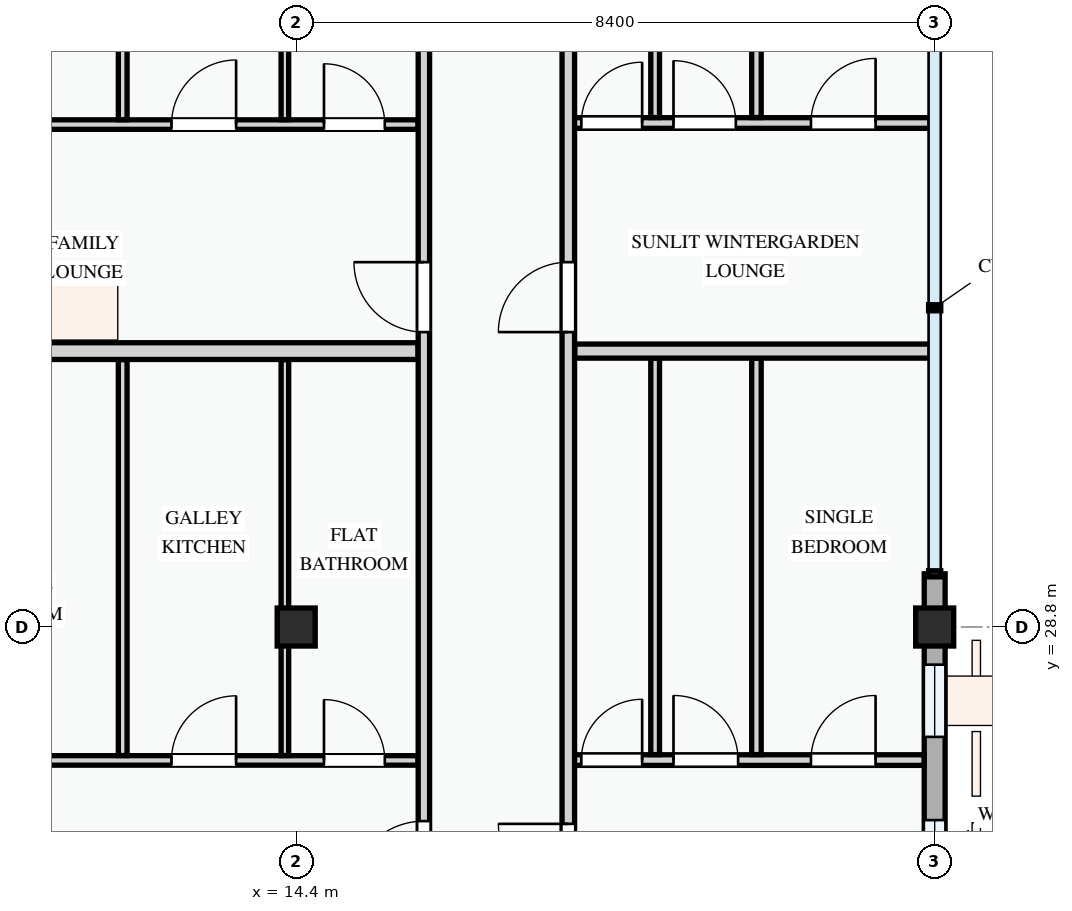
"""IFC4 building model, lengths in metres.
Left out: names, types, materials, properties, quantities, classifications, styles, units other than length and angle.
Written with IfcOpenShell. Run it as: python <this file> out.ifc"""

import sys

from ifc_helpers import new_model, si_unit, direction, frame, frame_2d, origin, origin_2d, place, context, subcontext, project, spatial, rectangle, extrude, element, fill, save


model = new_model("IFC4")
c1 = context("Model", 3, precision=1e-05, world=origin(), true_north=direction((0.0, 1.0)))
c2 = subcontext(c1, "Body", "Model", "MODEL_VIEW")
j1 = project(units=[si_unit("LENGTHUNIT", "METRE"), si_unit("PLANEANGLEUNIT", "RADIAN")], contexts=[c1])
p1 = place(None, origin())
s1 = spatial("IfcSite", under=j1, at=p1, CompositionType="ELEMENT")
p2 = place(p1, origin())
s2 = spatial("IfcBuilding", under=s1, at=p2, CompositionType="ELEMENT")
p3 = place(p2, frame((0.0, 0.0, 24.6)))
s3 = spatial("IfcBuildingStorey", under=s2, at=p3, CompositionType="ELEMENT", Elevation=24.6)
for number, where, z_axis, x_axis in (
    (1, (14.4, 28.8, 0.0), (0.0, 0.0, 1.0), (1.0, 0.0, 0.0)),
    (2, (22.8, 28.8, 0.0), (0.0, 0.0, 1.0), (1.0, 0.0, 0.0)),
):
    element("IfcColumn", number, at=place(p3, frame(where, z_axis=z_axis, x_axis=x_axis)), inside=s3, PredefinedType="COLUMN", context=c2, shape_type="SweptSolid", body=[
        extrude(rectangle(XDim=0.5, YDim=0.5, at=origin_2d()), origin(), (0.0, 0.0, 1.0), 3.3),
    ])
p4 = place(p3, frame((22.8, 22.8, 0.0), z_axis=(0.0, 0.0, 1.0), x_axis=(0.0, 1.0, 0.0)))
e3 = element("IfcWall", 3, at=p4, inside=s3, PredefinedType="STANDARD", context=c2, shape_type="SweptSolid", body=[
    extrude(rectangle(XDim=6.0, YDim=0.275, at=frame_2d((3.0, 0.0))), origin(), (0.0, 0.0, 1.0), 2.575),
])
p5 = place(p4, frame((0.98, 0.0, 0.78)))
e4 = element("IfcOpeningElement", 4, at=p5, cuts=e3, PredefinedType="OPENING", context=c2, shape_type="SweptSolid", body=[
    extrude(rectangle(XDim=2.48, YDim=1.46, at=frame_2d((1.24, 0.73))), frame((0.0, 0.147, 0.0), z_axis=(0.0, -1.0, 0.0), x_axis=(1.0, 0.0, 0.0)), (0.0, 0.0, 1.0), 0.295),
])
p6 = place(p4, frame((4.555, 0.0, 0.78)))
e5 = element("IfcOpeningElement", 5, at=p6, cuts=e3, PredefinedType="OPENING", context=c2, shape_type="SweptSolid", body=[
    extrude(rectangle(XDim=0.95, YDim=1.15, at=frame_2d((0.475, 0.575))), frame((0.0, 0.147, 0.0), z_axis=(0.0, -1.0, 0.0), x_axis=(1.0, 0.0, 0.0)), (0.0, 0.0, 1.0), 0.295),
])
p7 = place(p3, frame((22.8, 28.8, 0.0), z_axis=(0.0, 0.0, 1.0), x_axis=(0.0, 1.0, 0.0)))
e6 = element("IfcWall", 6, at=p7, inside=s3, PredefinedType="STANDARD", context=c2, shape_type="SweptSolid", body=[
    extrude(rectangle(XDim=0.7, YDim=0.275, at=frame_2d((0.35, 0.0))), origin(), (0.0, 0.0, 1.0), 2.425),
])
p8 = place(p3, frame((8.54, 27.045, 0.0), z_axis=(0.0, 0.0, 1.0), x_axis=(1.0, 0.0, 0.0)))
e7 = element("IfcWall", 7, at=p8, inside=s3, PredefinedType="PARTITIONING", context=c2, shape_type="SweptSolid", body=[
    extrude(rectangle(XDim=7.463, YDim=0.125, at=frame_2d((3.732, 0.0))), origin(), (0.0, 0.0, 1.0), 3.0),
])
p9 = place(p8, frame((1.324, 0.0, 0.0)))
e8 = element("IfcOpeningElement", 8, at=p9, cuts=e7, PredefinedType="OPENING", context=c2, shape_type="SweptSolid", body=[
    extrude(rectangle(XDim=0.85, YDim=2.1, at=frame_2d((0.425, 1.05))), frame((0.0, 0.073, 0.0), z_axis=(0.0, -1.0, 0.0), x_axis=(1.0, 0.0, 0.0)), (0.0, 0.0, 1.0), 0.145),
])
p10 = place(p8, frame((4.22, 0.0, 0.0)))
e9 = element("IfcOpeningElement", 9, at=p10, cuts=e7, PredefinedType="OPENING", context=c2, shape_type="SweptSolid", body=[
    extrude(rectangle(XDim=0.85, YDim=2.1, at=frame_2d((0.425, 1.05))), frame((0.0, 0.073, 0.0), z_axis=(0.0, -1.0, 0.0), x_axis=(1.0, 0.0, 0.0)), (0.0, 0.0, 1.0), 0.145),
])
p11 = place(p8, frame((6.226, 0.0, 0.0)))
e10 = element("IfcOpeningElement", 10, at=p11, cuts=e7, PredefinedType="OPENING", context=c2, shape_type="SweptSolid", body=[
    extrude(rectangle(XDim=0.8, YDim=2.1, at=frame_2d((0.4, 1.05))), frame((0.0, 0.073, 0.0), z_axis=(0.0, -1.0, 0.0), x_axis=(1.0, 0.0, 0.0)), (0.0, 0.0, 1.0), 0.145),
])
p12 = place(p3, frame((12.118, 27.11, 0.0), z_axis=(0.0, 0.0, 1.0), x_axis=(0.0, 1.0, 0.0)))
e11 = element("IfcWall", 11, at=p12, inside=s3, PredefinedType="PARTITIONING", context=c2, shape_type="SweptSolid", body=[
    extrude(rectangle(XDim=5.208, YDim=0.115, at=frame_2d((2.604, 0.0))), origin(), (0.0, 0.0, 1.0), 3.0),
])
p13 = place(p3, frame((14.251, 27.11, 0.0), z_axis=(0.0, 0.0, 1.0), x_axis=(0.0, 1.0, 0.0)))
e12 = element("IfcWall", 12, at=p13, inside=s3, PredefinedType="PARTITIONING", context=c2, shape_type="SweptSolid", body=[
    extrude(rectangle(XDim=5.208, YDim=0.1, at=frame_2d((2.604, 0.0))), origin(), (0.0, 0.0, 1.0), 2.425),
])
p14 = place(p3, frame((17.98, 27.05, 0.0), z_axis=(0.0, 0.0, 1.0), x_axis=(1.0, 0.0, 0.0)))
e13 = element("IfcWall", 13, at=p14, inside=s3, PredefinedType="PARTITIONING", context=c2, shape_type="SweptSolid", body=[
    extrude(rectangle(XDim=4.68, YDim=0.14, at=frame_2d((2.34, 0.0))), origin(), (0.0, 0.0, 1.0), 3.0),
])
p15 = place(p14, frame((0.171, 0.0, 0.0)))
e14 = element("IfcOpeningElement", 14, at=p15, cuts=e13, PredefinedType="OPENING", context=c2, shape_type="SweptSolid", body=[
    extrude(rectangle(XDim=0.8, YDim=2.1, at=frame_2d((0.4, 1.05))), frame((0.0, 0.08, 0.0), z_axis=(0.0, -1.0, 0.0), x_axis=(1.0, 0.0, 0.0)), (0.0, 0.0, 1.0), 0.16),
])
p16 = place(p14, frame((1.384, 0.0, 0.0)))
e15 = element("IfcOpeningElement", 15, at=p16, cuts=e13, PredefinedType="OPENING", context=c2, shape_type="SweptSolid", body=[
    extrude(rectangle(XDim=0.85, YDim=2.1, at=frame_2d((0.425, 1.05))), frame((0.0, 0.08, 0.0), z_axis=(0.0, -1.0, 0.0), x_axis=(1.0, 0.0, 0.0)), (0.0, 0.0, 1.0), 0.16),
])
p17 = place(p14, frame((3.193, 0.0, 0.0)))
e16 = element("IfcOpeningElement", 16, at=p17, cuts=e13, PredefinedType="OPENING", context=c2, shape_type="SweptSolid", body=[
    extrude(rectangle(XDim=0.85, YDim=2.1, at=frame_2d((0.425, 1.05))), frame((0.0, 0.08, 0.0), z_axis=(0.0, -1.0, 0.0), x_axis=(1.0, 0.0, 0.0)), (0.0, 0.0, 1.0), 0.16),
])
p18 = place(p3, frame((20.455, 27.122, 0.0), z_axis=(0.0, 0.0, 1.0), x_axis=(0.0, 1.0, 0.0)))
e17 = element("IfcWall", 17, at=p18, inside=s3, PredefinedType="PARTITIONING", context=c2, shape_type="SweptSolid", body=[
    extrude(rectangle(XDim=5.214, YDim=0.125, at=frame_2d((2.607, 0.0))), origin(), (0.0, 0.0, 1.0), 3.0),
])
p19 = place(p3, frame((19.122, 27.122, 0.0), z_axis=(0.0, 0.0, 1.0), x_axis=(0.0, 1.0, 0.0)))
e18 = element("IfcWall", 18, at=p19, inside=s3, PredefinedType="PARTITIONING", context=c2, shape_type="SweptSolid", body=[
    extrude(rectangle(XDim=5.214, YDim=0.115, at=frame_2d((2.607, 0.0))), origin(), (0.0, 0.0, 1.0), 3.0),
])
p20 = place(p3, frame((8.54, 35.41, 0.0), z_axis=(0.0, 0.0, 1.0), x_axis=(1.0, 0.0, 0.0)))
e19 = element("IfcWall", 19, at=p20, inside=s3, PredefinedType="PARTITIONING", context=c2, shape_type="SweptSolid", body=[
    extrude(rectangle(XDim=7.463, YDim=0.125, at=frame_2d((3.732, 0.0))), origin(), (0.0, 0.0, 1.0), 3.0),
])
p21 = place(p20, frame((1.324, 0.0, 0.0)))
e20 = element("IfcOpeningElement", 20, at=p21, cuts=e19, PredefinedType="OPENING", context=c2, shape_type="SweptSolid", body=[
    extrude(rectangle(XDim=0.82, YDim=2.08, at=frame_2d((0.41, 1.04))), frame((0.0, 0.073, 0.0), z_axis=(0.0, -1.0, 0.0), x_axis=(1.0, 0.0, 0.0)), (0.0, 0.0, 1.0), 0.145),
])
p22 = place(p20, frame((4.22, 0.0, 0.0)))
e21 = element("IfcOpeningElement", 21, at=p22, cuts=e19, PredefinedType="OPENING", context=c2, shape_type="SweptSolid", body=[
    extrude(rectangle(XDim=0.85, YDim=2.1, at=frame_2d((0.425, 1.05))), frame((0.0, 0.073, 0.0), z_axis=(0.0, -1.0, 0.0), x_axis=(1.0, 0.0, 0.0)), (0.0, 0.0, 1.0), 0.145),
])
p23 = place(p20, frame((6.226, 0.0, 0.0)))
e22 = element("IfcOpeningElement", 22, at=p23, cuts=e19, PredefinedType="OPENING", context=c2, shape_type="SweptSolid", body=[
    extrude(rectangle(XDim=0.8, YDim=2.1, at=frame_2d((0.4, 1.05))), frame((0.0, 0.073, 0.0), z_axis=(0.0, -1.0, 0.0), x_axis=(1.0, 0.0, 0.0)), (0.0, 0.0, 1.0), 0.145),
])
p24 = place(p3, frame((12.118, 35.475, 0.0), z_axis=(0.0, 0.0, 1.0), x_axis=(0.0, 1.0, 0.0)))
e23 = element("IfcWall", 23, at=p24, inside=s3, PredefinedType="PARTITIONING", context=c2, shape_type="SweptSolid", body=[
    extrude(rectangle(XDim=5.813, YDim=0.115, at=frame_2d((2.907, 0.0))), origin(), (0.0, 0.0, 1.0), 3.0),
])
p25 = place(p3, frame((14.251, 35.475, 0.0), z_axis=(0.0, 0.0, 1.0), x_axis=(0.0, 1.0, 0.0)))
e24 = element("IfcWall", 24, at=p25, inside=s3, PredefinedType="PARTITIONING", context=c2, shape_type="SweptSolid", body=[
    extrude(rectangle(XDim=5.813, YDim=0.1, at=frame_2d((2.907, 0.0))), origin(), (0.0, 0.0, 1.0), 2.425),
])
p26 = place(p3, frame((17.98, 35.431, 0.0), z_axis=(0.0, 0.0, 1.0), x_axis=(1.0, 0.0, 0.0)))
e25 = element("IfcWall", 25, at=p26, inside=s3, PredefinedType="PARTITIONING", context=c2, shape_type="SweptSolid", body=[
    extrude(rectangle(XDim=4.76, YDim=0.14, at=frame_2d((2.38, 0.0))), origin(), (0.0, 0.0, 1.0), 3.0),
])
p27 = place(p26, frame((0.171, 0.0, 0.0)))
e26 = element("IfcOpeningElement", 26, at=p27, cuts=e25, PredefinedType="OPENING", context=c2, shape_type="SweptSolid", body=[
    extrude(rectangle(XDim=0.8, YDim=2.1, at=frame_2d((0.4, 1.05))), frame((0.0, 0.08, 0.0), z_axis=(0.0, -1.0, 0.0), x_axis=(1.0, 0.0, 0.0)), (0.0, 0.0, 1.0), 0.16),
])
p28 = place(p26, frame((1.384, 0.0, 0.0)))
e27 = element("IfcOpeningElement", 27, at=p28, cuts=e25, PredefinedType="OPENING", context=c2, shape_type="SweptSolid", body=[
    extrude(rectangle(XDim=0.82, YDim=2.08, at=frame_2d((0.41, 1.04))), frame((0.0, 0.08, 0.0), z_axis=(0.0, -1.0, 0.0), x_axis=(1.0, 0.0, 0.0)), (0.0, 0.0, 1.0), 0.16),
])
p29 = place(p26, frame((3.193, 0.0, 0.0)))
e28 = element("IfcOpeningElement", 28, at=p29, cuts=e25, PredefinedType="OPENING", context=c2, shape_type="SweptSolid", body=[
    extrude(rectangle(XDim=0.85, YDim=2.1, at=frame_2d((0.425, 1.05))), frame((0.0, 0.08, 0.0), z_axis=(0.0, -1.0, 0.0), x_axis=(1.0, 0.0, 0.0)), (0.0, 0.0, 1.0), 0.16),
])
p30 = place(p3, frame((20.455, 35.503, 0.0), z_axis=(0.0, 0.0, 1.0), x_axis=(0.0, 1.0, 0.0)))
e29 = element("IfcWall", 29, at=p30, inside=s3, PredefinedType="PARTITIONING", context=c2, shape_type="SweptSolid", body=[
    extrude(rectangle(XDim=5.775, YDim=0.125, at=frame_2d((2.888, 0.0))), origin(), (0.0, 0.0, 1.0), 3.0),
])
p31 = place(p3, frame((19.122, 35.503, 0.0), z_axis=(0.0, 0.0, 1.0), x_axis=(0.0, 1.0, 0.0)))
e30 = element("IfcWall", 30, at=p31, inside=s3, PredefinedType="PARTITIONING", context=c2, shape_type="SweptSolid", body=[
    extrude(rectangle(XDim=5.775, YDim=0.115, at=frame_2d((2.888, 0.0))), origin(), (0.0, 0.0, 1.0), 3.0),
])
p32 = place(p3, frame((8.54, 32.43, 0.0), z_axis=(0.0, 0.0, 1.0), x_axis=(1.0, 0.0, 0.0)))
e31 = element("IfcWall", 31, at=p32, inside=s3, PredefinedType="PARTITIONING", context=c2, shape_type="SweptSolid", body=[
    extrude(rectangle(XDim=7.463, YDim=0.22, at=frame_2d((3.732, 0.0))), origin(), (0.0, 0.0, 1.0), 3.0),
])
p33 = place(p3, frame((18.064, 32.43, 0.0), z_axis=(0.0, 0.0, 1.0), x_axis=(1.0, 0.0, 0.0)))
e32 = element("IfcWall", 32, at=p33, inside=s3, PredefinedType="PARTITIONING", context=c2, shape_type="SweptSolid", body=[
    extrude(rectangle(XDim=4.676, YDim=0.185, at=frame_2d((2.338, 0.0))), origin(), (0.0, 0.0, 1.0), 3.0),
])
p34 = place(p3, frame((16.08, 22.66, 0.0), z_axis=(0.0, 0.0, 1.0), x_axis=(0.0, 1.0, 0.0)))
e33 = element("IfcWall", 33, at=p34, inside=s3, PredefinedType="PARTITIONING", context=c2, shape_type="SweptSolid", body=[
    extrude(rectangle(XDim=34.801, YDim=0.15, at=frame_2d((17.4, 0.0))), origin(), (0.0, 0.0, 1.0), 3.0),
])
p35 = place(p34, frame((2.627, 0.0, 0.0)))
e34 = element("IfcOpeningElement", 34, at=p35, cuts=e33, PredefinedType="OPENING", context=c2, shape_type="SweptSolid", body=[
    extrude(rectangle(XDim=0.96, YDim=2.12, at=frame_2d((0.48, 1.06))), frame((0.0, 0.085, 0.0), z_axis=(0.0, -1.0, 0.0), x_axis=(1.0, 0.0, 0.0)), (0.0, 0.0, 1.0), 0.17),
])
p36 = place(p34, frame((10.02, 0.0, 0.0)))
e35 = element("IfcOpeningElement", 35, at=p36, cuts=e33, PredefinedType="OPENING", context=c2, shape_type="SweptSolid", body=[
    extrude(rectangle(XDim=0.92, YDim=2.1, at=frame_2d((0.46, 1.05))), frame((0.0, 0.085, 0.0), z_axis=(0.0, -1.0, 0.0), x_axis=(1.0, 0.0, 0.0)), (0.0, 0.0, 1.0), 0.17),
])
p37 = place(p34, frame((24.355, 0.0, 0.0)))
e36 = element("IfcOpeningElement", 36, at=p37, cuts=e33, PredefinedType="OPENING", context=c2, shape_type="SweptSolid", body=[
    extrude(rectangle(XDim=0.92, YDim=2.1, at=frame_2d((0.46, 1.05))), frame((0.0, 0.085, 0.0), z_axis=(0.0, -1.0, 0.0), x_axis=(1.0, 0.0, 0.0)), (0.0, 0.0, 1.0), 0.17),
])
p38 = place(p3, frame((17.98, 22.66, 0.0), z_axis=(0.0, 0.0, 1.0), x_axis=(0.0, 1.0, 0.0)))
e37 = element("IfcWall", 37, at=p38, inside=s3, PredefinedType="PARTITIONING", context=c2, shape_type="SweptSolid", body=[
    extrude(rectangle(XDim=34.801, YDim=0.165, at=frame_2d((17.4, 0.0))), origin(), (0.0, 0.0, 1.0), 3.0),
])
p39 = place(p38, frame((2.63, 0.0, 0.0)))
e38 = element("IfcOpeningElement", 38, at=p39, cuts=e37, PredefinedType="OPENING", context=c2, shape_type="SweptSolid", body=[
    extrude(rectangle(XDim=0.92, YDim=2.1, at=frame_2d((0.46, 1.05))), frame((0.0, 0.093, 0.0), z_axis=(0.0, -1.0, 0.0), x_axis=(1.0, 0.0, 0.0)), (0.0, 0.0, 1.0), 0.185),
])
p40 = place(p38, frame((10.02, 0.0, 0.0)))
e39 = element("IfcOpeningElement", 39, at=p40, cuts=e37, PredefinedType="OPENING", context=c2, shape_type="SweptSolid", body=[
    extrude(rectangle(XDim=0.92, YDim=2.1, at=frame_2d((0.46, 1.05))), frame((0.0, 0.093, 0.0), z_axis=(0.0, -1.0, 0.0), x_axis=(1.0, 0.0, 0.0)), (0.0, 0.0, 1.0), 0.185),
])
p41 = place(p38, frame((24.289, 0.0, 0.0)))
e40 = element("IfcOpeningElement", 40, at=p41, cuts=e37, PredefinedType="OPENING", context=c2, shape_type="SweptSolid", body=[
    extrude(rectangle(XDim=0.96, YDim=2.12, at=frame_2d((0.48, 1.06))), frame((0.0, 0.093, 0.0), z_axis=(0.0, -1.0, 0.0), x_axis=(1.0, 0.0, 0.0)), (0.0, 0.0, 1.0), 0.185),
])
p42 = place(p5, origin())
e41 = element("IfcWindow", 41, at=p42, inside=s3, PartitioningType="DOUBLE_PANEL_VERTICAL", PredefinedType="WINDOW", context=c2, shape_type="SweptSolid", body=[
    extrude(rectangle(XDim=2.48, YDim=1.46, at=frame_2d((1.24, 0.73))), frame((0.0, 0.03, 0.0), z_axis=(0.0, -1.0, 0.0), x_axis=(1.0, 0.0, 0.0)), (0.0, 0.0, 1.0), 0.06),
])
fill(e4, e41)
p43 = place(p6, origin())
e42 = element("IfcWindow", 42, at=p43, inside=s3, PartitioningType="SINGLE_PANEL", PredefinedType="WINDOW", context=c2, shape_type="SweptSolid", body=[
    extrude(rectangle(XDim=0.95, YDim=1.15, at=frame_2d((0.475, 0.575))), frame((0.0, 0.03, 0.0), z_axis=(0.0, -1.0, 0.0), x_axis=(1.0, 0.0, 0.0)), (0.0, 0.0, 1.0), 0.06),
])
fill(e5, e42)
p44 = place(p10, origin())
e43 = element("IfcDoor", 43, at=p44, inside=s3, OperationType="SINGLE_SWING_RIGHT", PredefinedType="DOOR", context=c2, shape_type="SweptSolid", body=[
    extrude(rectangle(XDim=0.85, YDim=2.1, at=frame_2d((0.425, 1.05))), frame((0.0, 0.025, 0.0), z_axis=(0.0, -1.0, 0.0), x_axis=(1.0, 0.0, 0.0)), (0.0, 0.0, 1.0), 0.05),
])
fill(e9, e43)
p45 = place(p11, origin())
e44 = element("IfcDoor", 44, at=p45, inside=s3, OperationType="SINGLE_SWING_LEFT", PredefinedType="DOOR", context=c2, shape_type="SweptSolid", body=[
    extrude(rectangle(XDim=0.8, YDim=2.1, at=frame_2d((0.4, 1.05))), frame((0.0, 0.025, 0.0), z_axis=(0.0, -1.0, 0.0), x_axis=(1.0, 0.0, 0.0)), (0.0, 0.0, 1.0), 0.05),
])
fill(e10, e44)
p46 = place(p15, origin())
e45 = element("IfcDoor", 45, at=p46, inside=s3, OperationType="SINGLE_SWING_RIGHT", PredefinedType="DOOR", context=c2, shape_type="SweptSolid", body=[
    extrude(rectangle(XDim=0.8, YDim=2.1, at=frame_2d((0.4, 1.05))), frame((0.0, 0.025, 0.0), z_axis=(0.0, -1.0, 0.0), x_axis=(1.0, 0.0, 0.0)), (0.0, 0.0, 1.0), 0.05),
])
fill(e14, e45)
p47 = place(p16, origin())
e46 = element("IfcDoor", 46, at=p47, inside=s3, OperationType="SINGLE_SWING_LEFT", PredefinedType="DOOR", context=c2, shape_type="SweptSolid", body=[
    extrude(rectangle(XDim=0.85, YDim=2.1, at=frame_2d((0.425, 1.05))), frame((0.0, 0.025, 0.0), z_axis=(0.0, -1.0, 0.0), x_axis=(1.0, 0.0, 0.0)), (0.0, 0.0, 1.0), 0.05),
])
fill(e15, e46)
p48 = place(p17, origin())
e47 = element("IfcDoor", 47, at=p48, inside=s3, OperationType="SINGLE_SWING_RIGHT", PredefinedType="DOOR", context=c2, shape_type="SweptSolid", body=[
    extrude(rectangle(XDim=0.85, YDim=2.1, at=frame_2d((0.425, 1.05))), frame((0.0, 0.025, 0.0), z_axis=(0.0, -1.0, 0.0), x_axis=(1.0, 0.0, 0.0)), (0.0, 0.0, 1.0), 0.05),
])
fill(e16, e47)
p49 = place(p22, origin())
e48 = element("IfcDoor", 48, at=p49, inside=s3, OperationType="SINGLE_SWING_RIGHT", PredefinedType="DOOR", context=c2, shape_type="SweptSolid", body=[
    extrude(rectangle(XDim=0.85, YDim=2.1, at=frame_2d((0.425, 1.05))), frame((0.0, 0.025, 0.0), z_axis=(0.0, -1.0, 0.0), x_axis=(1.0, 0.0, 0.0)), (0.0, 0.0, 1.0), 0.05),
])
fill(e21, e48)
p50 = place(p23, origin())
e49 = element("IfcDoor", 49, at=p50, inside=s3, OperationType="SINGLE_SWING_LEFT", PredefinedType="DOOR", context=c2, shape_type="SweptSolid", body=[
    extrude(rectangle(XDim=0.8, YDim=2.1, at=frame_2d((0.4, 1.05))), frame((0.0, 0.025, 0.0), z_axis=(0.0, -1.0, 0.0), x_axis=(1.0, 0.0, 0.0)), (0.0, 0.0, 1.0), 0.05),
])
fill(e22, e49)
p51 = place(p27, origin())
e50 = element("IfcDoor", 50, at=p51, inside=s3, OperationType="SINGLE_SWING_RIGHT", PredefinedType="DOOR", context=c2, shape_type="SweptSolid", body=[
    extrude(rectangle(XDim=0.8, YDim=2.1, at=frame_2d((0.4, 1.05))), frame((0.0, 0.025, 0.0), z_axis=(0.0, -1.0, 0.0), x_axis=(1.0, 0.0, 0.0)), (0.0, 0.0, 1.0), 0.05),
])
fill(e26, e50)
p52 = place(p28, origin())
e51 = element("IfcDoor", 51, at=p52, inside=s3, OperationType="SINGLE_SWING_LEFT", PredefinedType="DOOR", context=c2, shape_type="SweptSolid", body=[
    extrude(rectangle(XDim=0.82, YDim=2.08, at=frame_2d((0.41, 1.04))), frame((0.0, 0.025, 0.0), z_axis=(0.0, -1.0, 0.0), x_axis=(1.0, 0.0, 0.0)), (0.0, 0.0, 1.0), 0.05),
])
fill(e27, e51)
p53 = place(p29, origin())
e52 = element("IfcDoor", 52, at=p53, inside=s3, OperationType="SINGLE_SWING_RIGHT", PredefinedType="DOOR", context=c2, shape_type="SweptSolid", body=[
    extrude(rectangle(XDim=0.85, YDim=2.1, at=frame_2d((0.425, 1.05))), frame((0.0, 0.025, 0.0), z_axis=(0.0, -1.0, 0.0), x_axis=(1.0, 0.0, 0.0)), (0.0, 0.0, 1.0), 0.05),
])
fill(e28, e52)
p54 = place(p35, origin())
e53 = element("IfcDoor", 53, at=p54, inside=s3, OperationType="SINGLE_SWING_LEFT", PredefinedType="DOOR", context=c2, shape_type="SweptSolid", body=[
    extrude(rectangle(XDim=0.96, YDim=2.12, at=frame_2d((0.48, 1.06))), frame((0.0, 0.025, 0.0), z_axis=(0.0, -1.0, 0.0), x_axis=(1.0, 0.0, 0.0)), (0.0, 0.0, 1.0), 0.05),
])
fill(e34, e53)
p55 = place(p36, origin())
e54 = element("IfcDoor", 54, at=p55, inside=s3, OperationType="SINGLE_SWING_RIGHT", PredefinedType="DOOR", context=c2, shape_type="SweptSolid", body=[
    extrude(rectangle(XDim=0.92, YDim=2.1, at=frame_2d((0.46, 1.05))), frame((0.0, 0.025, 0.0), z_axis=(0.0, -1.0, 0.0), x_axis=(1.0, 0.0, 0.0)), (0.0, 0.0, 1.0), 0.05),
])
fill(e35, e54)
p56 = place(p39, origin())
e55 = element("IfcDoor", 55, at=p56, inside=s3, OperationType="SINGLE_SWING_RIGHT", PredefinedType="DOOR", context=c2, shape_type="SweptSolid", body=[
    extrude(rectangle(XDim=0.92, YDim=2.1, at=frame_2d((0.46, 1.05))), frame((0.0, 0.025, 0.0), z_axis=(0.0, -1.0, 0.0), x_axis=(1.0, 0.0, 0.0)), (0.0, 0.0, 1.0), 0.05),
])
fill(e38, e55)
p57 = place(p40, origin())
e56 = element("IfcDoor", 56, at=p57, inside=s3, OperationType="SINGLE_SWING_LEFT", PredefinedType="DOOR", context=c2, shape_type="SweptSolid", body=[
    extrude(rectangle(XDim=0.92, YDim=2.1, at=frame_2d((0.46, 1.05))), frame((0.0, 0.025, 0.0), z_axis=(0.0, -1.0, 0.0), x_axis=(1.0, 0.0, 0.0)), (0.0, 0.0, 1.0), 0.05),
])
fill(e39, e56)
save(model, sys.argv[1])
